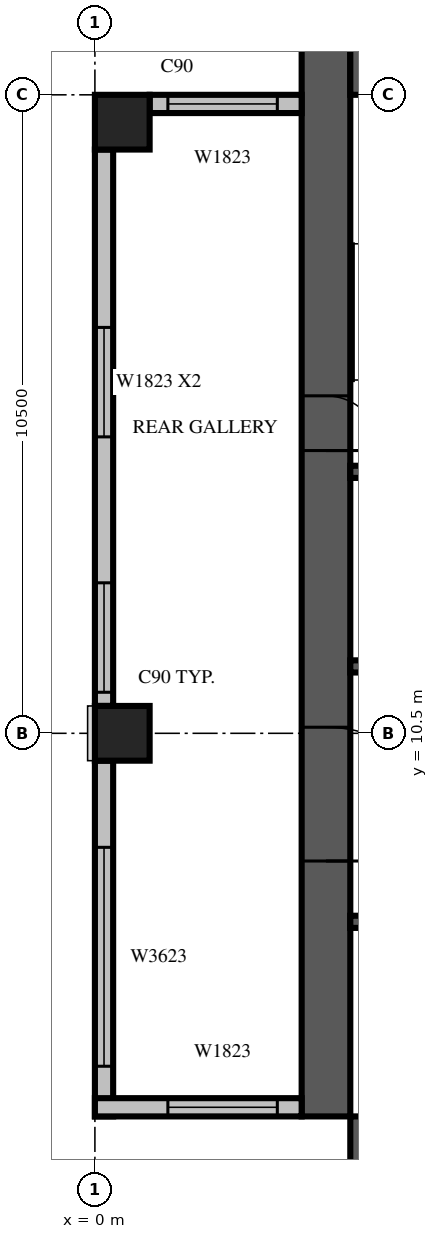
"""IFC4 building model, lengths in metres.
Left out: names, types, materials, properties, quantities, classifications, styles, units other than length and angle.
Written with IfcOpenShell. Run it as: python <this file> out.ifc"""

import sys

from ifc_helpers import new_model, si_unit, direction, frame, frame_2d, origin, origin_2d, place, context, subcontext, project, spatial, rectangle, extrude, source, transform, mapped, element, fill, save


model = new_model("IFC4")
c1 = context("Model", 3, precision=1e-05, world=origin(), true_north=direction((0.0, 1.0)))
c2 = subcontext(c1, "Body", "Model", "MODEL_VIEW")
j1 = project(units=[si_unit("LENGTHUNIT", "METRE"), si_unit("PLANEANGLEUNIT", "RADIAN")], contexts=[c1])
p1 = place(None, origin())
s1 = spatial("IfcSite", under=j1, at=p1, CompositionType="ELEMENT")
p2 = place(p1, origin())
s2 = spatial("IfcBuilding", under=s1, at=p2, CompositionType="ELEMENT")
p3 = place(p2, frame((0.0, 0.0, 219.6)))
s3 = spatial("IfcBuildingStorey", under=s2, at=p3, CompositionType="ELEMENT", Elevation=219.6)
m1 = source(origin(), c2, "Body", "SweptSolid", [
    extrude(rectangle(XDim=0.9, YDim=0.9, at=origin_2d()), origin(), (0.0, 0.0, 1.0), 3.8),
])
for number, where, z_axis, x_axis in (
    (1, (0.45, 10.5, 0.0), (0.0, 0.0, 1.0), (1.0, 0.0, 0.0)),
    (2, (0.45, 20.55, 0.0), (0.0, 0.0, 1.0), (1.0, 0.0, 0.0)),
):
    element("IfcColumn", number, at=place(p3, frame(where, z_axis=z_axis, x_axis=x_axis)), inside=s3, PredefinedType="COLUMN", context=c2, shape_type="MappedRepresentation", body=[
        mapped(m1, transform((0.0, 0.0, 0.0), scale=1.0)),
    ])
m2 = source(origin(), c2, "Body", "SweptSolid", [
    extrude(rectangle(XDim=17.6, YDim=0.8, at=frame_2d((8.8, 0.0))), origin(), (0.0, 0.0, 1.0), 3.8),
])
p4 = place(p3, frame((3.8, 4.2, 0.0), z_axis=(0.0, 0.0, 1.0), x_axis=(0.0, 1.0, 0.0)))
e3 = element("IfcWall", 3, at=p4, inside=s3, PredefinedType="SHEAR", context=c2, shape_type="MappedRepresentation", body=[
    mapped(m2, transform((0.0, 0.0, 0.0), scale=1.0)),
])
m3 = source(origin(), c2, "Body", "SweptSolid", [
    extrude(rectangle(XDim=2.2, YDim=2.1, at=frame_2d((1.1, 1.05))), frame((0.0, 0.41, 0.0), z_axis=(0.0, -1.0, 0.0), x_axis=(1.0, 0.0, 0.0)), (0.0, 0.0, 1.0), 0.82),
])
p5 = place(p4, frame((4.2, 0.0, 0.0)))
e4 = element("IfcOpeningElement", 4, at=p5, cuts=e3, PredefinedType="OPENING", context=c2, shape_type="MappedRepresentation", body=[
    mapped(m3, transform((0.0, 0.0, 0.0), scale=1.0)),
])
m4 = source(origin(), c2, "Body", "SweptSolid", [
    extrude(rectangle(XDim=0.9, YDim=2.1, at=frame_2d((0.45, 1.05))), frame((0.0, 0.41, 0.0), z_axis=(0.0, -1.0, 0.0), x_axis=(1.0, 0.0, 0.0)), (0.0, 0.0, 1.0), 0.82),
])
p6 = place(p4, frame((10.95, 0.0, 0.0)))
e5 = element("IfcOpeningElement", 5, at=p6, cuts=e3, PredefinedType="OPENING", context=c2, shape_type="MappedRepresentation", body=[
    mapped(m4, transform((0.0, 0.0, 0.0), scale=1.0)),
])
p7 = place(p3, frame((4.2, 3.8, 0.0), z_axis=(0.0, 0.0, 1.0), x_axis=(1.0, 0.0, 0.0)))
e6 = element("IfcWall", 6, at=p7, inside=s3, PredefinedType="SHEAR", context=c2, shape_type="MappedRepresentation", body=[
    mapped(m2, transform((0.0, 0.0, 0.0), scale=1.0)),
])
p8 = place(p7, frame((12.75, 0.0, 0.0)))
e7 = element("IfcOpeningElement", 7, at=p8, cuts=e6, PredefinedType="OPENING", context=c2, shape_type="MappedRepresentation", body=[
    mapped(m4, transform((0.0, 0.0, 0.0), scale=1.0)),
])
m5 = source(origin(), c2, "Body", "SweptSolid", [
    extrude(rectangle(XDim=16.8, YDim=0.8, at=frame_2d((8.4, 0.0))), origin(), (0.0, 0.0, 1.0), 3.8),
])
p9 = place(p3, frame((4.2, 21.4, 0.0), z_axis=(0.0, 0.0, 1.0), x_axis=(1.0, 0.0, 0.0)))
e8 = element("IfcWall", 8, at=p9, inside=s3, PredefinedType="SHEAR", context=c2, shape_type="MappedRepresentation", body=[
    mapped(m5, transform((0.0, 0.0, 0.0), scale=1.0)),
])
m6 = source(origin(), c2, "Body", "SweptSolid", [
    extrude(rectangle(XDim=1.2, YDim=2.1, at=frame_2d((0.6, 1.05))), frame((0.0, 0.41, 0.0), z_axis=(0.0, -1.0, 0.0), x_axis=(1.0, 0.0, 0.0)), (0.0, 0.0, 1.0), 0.82),
])
p10 = place(p9, frame((6.2, 0.0, 0.0)))
e9 = element("IfcOpeningElement", 9, at=p10, cuts=e8, PredefinedType="OPENING", context=c2, shape_type="MappedRepresentation", body=[
    mapped(m6, transform((0.0, 0.0, 0.0), scale=1.0)),
])
m7 = source(origin(), c2, "Body", "SweptSolid", [
    extrude(rectangle(XDim=2.5, YDim=0.3, at=frame_2d((1.25, 0.0))), origin(), (0.0, 0.0, 1.0), 3.4),
])
p11 = place(p3, frame((3.4, 20.85, 0.0), z_axis=(0.0, 0.0, 1.0), x_axis=(-1.0, 0.0, 0.0)))
e10 = element("IfcWall", 10, at=p11, inside=s3, PredefinedType="STANDARD", context=c2, shape_type="MappedRepresentation", body=[
    mapped(m7, transform((0.0, 0.0, 0.0), scale=1.0)),
])
m8 = source(origin(), c2, "Body", "SweptSolid", [
    extrude(rectangle(XDim=1.8, YDim=2.3, at=frame_2d((0.9, 1.15))), frame((0.0, 0.16, 0.0), z_axis=(0.0, -1.0, 0.0), x_axis=(1.0, 0.0, 0.0)), (0.0, 0.0, 1.0), 0.32),
])
p12 = place(p11, frame((0.4, 0.0, 0.6)))
e11 = element("IfcOpeningElement", 11, at=p12, cuts=e10, PredefinedType="OPENING", context=c2, shape_type="MappedRepresentation", body=[
    mapped(m8, transform((0.0, 0.0, 0.0), scale=1.0)),
])
m9 = source(origin(), c2, "Body", "SweptSolid", [
    extrude(rectangle(XDim=9.15, YDim=0.3, at=frame_2d((4.575, 0.0))), origin(), (0.0, 0.0, 1.0), 3.4),
])
p13 = place(p3, frame((0.15, 20.1, 0.0), z_axis=(0.0, 0.0, 1.0), x_axis=(0.0, -1.0, 0.0)))
e12 = element("IfcWall", 12, at=p13, inside=s3, PredefinedType="STANDARD", context=c2, shape_type="MappedRepresentation", body=[
    mapped(m9, transform((0.0, 0.0, 0.0), scale=1.0)),
])
p14 = place(p13, frame((2.925, 0.0, 0.6)))
e13 = element("IfcOpeningElement", 13, at=p14, cuts=e12, PredefinedType="OPENING", context=c2, shape_type="MappedRepresentation", body=[
    mapped(m8, transform((0.0, 0.0, 0.0), scale=1.0)),
])
p15 = place(p13, frame((7.125, 0.0, 0.6)))
e14 = element("IfcOpeningElement", 14, at=p15, cuts=e12, PredefinedType="OPENING", context=c2, shape_type="MappedRepresentation", body=[
    mapped(m8, transform((0.0, 0.0, 0.0), scale=1.0)),
])
m10 = source(origin(), c2, "Body", "SweptSolid", [
    extrude(rectangle(XDim=5.85, YDim=0.3, at=frame_2d((2.925, 0.0))), origin(), (0.0, 0.0, 1.0), 3.4),
])
p16 = place(p3, frame((0.15, 10.05, 0.0), z_axis=(0.0, 0.0, 1.0), x_axis=(0.0, -1.0, 0.0)))
e15 = element("IfcWall", 15, at=p16, inside=s3, PredefinedType="STANDARD", context=c2, shape_type="MappedRepresentation", body=[
    mapped(m10, transform((0.0, 0.0, 0.0), scale=1.0)),
])
m11 = source(origin(), c2, "Body", "SweptSolid", [
    extrude(rectangle(XDim=3.6, YDim=2.3, at=frame_2d((1.8, 1.15))), frame((0.0, 0.16, 0.0), z_axis=(0.0, -1.0, 0.0), x_axis=(1.0, 0.0, 0.0)), (0.0, 0.0, 1.0), 0.32),
])
p17 = place(p16, frame((1.425, 0.0, 0.6)))
e16 = element("IfcOpeningElement", 16, at=p17, cuts=e15, PredefinedType="OPENING", context=c2, shape_type="MappedRepresentation", body=[
    mapped(m11, transform((0.0, 0.0, 0.0), scale=1.0)),
])
m12 = source(origin(), c2, "Body", "SweptSolid", [
    extrude(rectangle(XDim=3.4, YDim=0.3, at=frame_2d((1.7, 0.0))), origin(), (0.0, 0.0, 1.0), 3.4),
])
p18 = place(p3, frame((0.0, 4.35, 0.0), z_axis=(0.0, 0.0, 1.0), x_axis=(1.0, 0.0, 0.0)))
e17 = element("IfcWall", 17, at=p18, inside=s3, PredefinedType="STANDARD", context=c2, shape_type="MappedRepresentation", body=[
    mapped(m12, transform((0.0, 0.0, 0.0), scale=1.0)),
])
p19 = place(p18, frame((1.2, 0.0, 0.6)))
e18 = element("IfcOpeningElement", 18, at=p19, cuts=e17, PredefinedType="OPENING", context=c2, shape_type="MappedRepresentation", body=[
    mapped(m8, transform((0.0, 0.0, 0.0), scale=1.0)),
])
m13 = source(origin(), c2, "Body", "SweptSolid", [
    extrude(rectangle(XDim=9.6, YDim=0.2, at=frame_2d((4.8, 0.0))), origin(), (0.0, 0.0, 1.0), 3.8),
])
p20 = place(p3, frame((4.2, 7.4, 0.0), z_axis=(0.0, 0.0, 1.0), x_axis=(1.0, 0.0, 0.0)))
e19 = element("IfcWall", 19, at=p20, inside=s3, PredefinedType="SOLIDWALL", context=c2, shape_type="MappedRepresentation", body=[
    mapped(m13, transform((0.0, 0.0, 0.0), scale=1.0)),
])
m14 = source(origin(), c2, "Body", "SweptSolid", [
    extrude(rectangle(XDim=1.1, YDim=2.1, at=frame_2d((0.55, 1.05))), frame((0.0, 0.11, 0.0), z_axis=(0.0, -1.0, 0.0), x_axis=(1.0, 0.0, 0.0)), (0.0, 0.0, 1.0), 0.22),
])
p21 = place(p20, frame((0.65, 0.0, 0.0)))
e20 = element("IfcOpeningElement", 20, at=p21, cuts=e19, PredefinedType="OPENING", context=c2, shape_type="MappedRepresentation", body=[
    mapped(m14, transform((0.0, 0.0, 0.0), scale=1.0)),
])
p22 = place(p20, frame((3.05, 0.0, 0.0)))
e21 = element("IfcOpeningElement", 21, at=p22, cuts=e19, PredefinedType="OPENING", context=c2, shape_type="MappedRepresentation", body=[
    mapped(m14, transform((0.0, 0.0, 0.0), scale=1.0)),
])
p23 = place(p20, frame((5.45, 0.0, 0.0)))
e22 = element("IfcOpeningElement", 22, at=p23, cuts=e19, PredefinedType="OPENING", context=c2, shape_type="MappedRepresentation", body=[
    mapped(m14, transform((0.0, 0.0, 0.0), scale=1.0)),
])
p24 = place(p20, frame((7.85, 0.0, 0.0)))
e23 = element("IfcOpeningElement", 23, at=p24, cuts=e19, PredefinedType="OPENING", context=c2, shape_type="MappedRepresentation", body=[
    mapped(m14, transform((0.0, 0.0, 0.0), scale=1.0)),
])
m15 = source(origin(), c2, "Body", "SweptSolid", [
    extrude(rectangle(XDim=4.8, YDim=0.2, at=frame_2d((2.4, 0.0))), origin(), (0.0, 0.0, 1.0), 3.8),
])
p25 = place(p3, frame((4.2, 11.6, 0.0), z_axis=(0.0, 0.0, 1.0), x_axis=(1.0, 0.0, 0.0)))
e24 = element("IfcWall", 24, at=p25, inside=s3, PredefinedType="SOLIDWALL", context=c2, shape_type="MappedRepresentation", body=[
    mapped(m15, transform((0.0, 0.0, 0.0), scale=1.0)),
])
p26 = place(p25, frame((0.65, 0.0, 0.0)))
e25 = element("IfcOpeningElement", 25, at=p26, cuts=e24, PredefinedType="OPENING", context=c2, shape_type="MappedRepresentation", body=[
    mapped(m14, transform((0.0, 0.0, 0.0), scale=1.0)),
])
p27 = place(p25, frame((3.05, 0.0, 0.0)))
e26 = element("IfcOpeningElement", 26, at=p27, cuts=e24, PredefinedType="OPENING", context=c2, shape_type="MappedRepresentation", body=[
    mapped(m14, transform((0.0, 0.0, 0.0), scale=1.0)),
])
p28 = place(p3, frame((4.2, 14.8, 0.0), z_axis=(0.0, 0.0, 1.0), x_axis=(1.0, 0.0, 0.0)))
e27 = element("IfcWall", 27, at=p28, inside=s3, PredefinedType="SOLIDWALL", context=c2, shape_type="MappedRepresentation", body=[
    mapped(m15, transform((0.0, 0.0, 0.0), scale=1.0)),
])
m16 = source(origin(), c2, "Body", "SweptSolid", [
    extrude(rectangle(XDim=1.8, YDim=2.3, at=frame_2d((0.9, 1.15))), frame((0.0, 0.03, 0.0), z_axis=(0.0, -1.0, 0.0), x_axis=(1.0, 0.0, 0.0)), (0.0, 0.0, 1.0), 0.06),
])
p29 = place(p12, origin())
e28 = element("IfcWindow", 28, at=p29, inside=s3, PartitioningType="SINGLE_PANEL", PredefinedType="WINDOW", context=c2, shape_type="MappedRepresentation", body=[
    mapped(m16, transform((0.0, 0.0, 0.0), scale=1.0)),
])
fill(e11, e28)
p30 = place(p14, origin())
e29 = element("IfcWindow", 29, at=p30, inside=s3, PartitioningType="SINGLE_PANEL", PredefinedType="WINDOW", context=c2, shape_type="MappedRepresentation", body=[
    mapped(m16, transform((0.0, 0.0, 0.0), scale=1.0)),
])
fill(e13, e29)
p31 = place(p15, origin())
e30 = element("IfcWindow", 30, at=p31, inside=s3, PartitioningType="SINGLE_PANEL", PredefinedType="WINDOW", context=c2, shape_type="MappedRepresentation", body=[
    mapped(m16, transform((0.0, 0.0, 0.0), scale=1.0)),
])
fill(e14, e30)
m17 = source(origin(), c2, "Body", "SweptSolid", [
    extrude(rectangle(XDim=3.6, YDim=2.3, at=frame_2d((1.8, 1.15))), frame((0.0, 0.03, 0.0), z_axis=(0.0, -1.0, 0.0), x_axis=(1.0, 0.0, 0.0)), (0.0, 0.0, 1.0), 0.06),
])
p32 = place(p17, origin())
e31 = element("IfcWindow", 31, at=p32, inside=s3, PartitioningType="SINGLE_PANEL", PredefinedType="WINDOW", context=c2, shape_type="MappedRepresentation", body=[
    mapped(m17, transform((0.0, 0.0, 0.0), scale=1.0)),
])
fill(e16, e31)
p33 = place(p19, origin())
e32 = element("IfcWindow", 32, at=p33, inside=s3, PartitioningType="SINGLE_PANEL", PredefinedType="WINDOW", context=c2, shape_type="MappedRepresentation", body=[
    mapped(m16, transform((0.0, 0.0, 0.0), scale=1.0)),
])
fill(e18, e32)
m18 = source(origin(), c2, "Body", "SweptSolid", [
    extrude(rectangle(XDim=2.2, YDim=2.1, at=frame_2d((1.1, 1.05))), frame((0.0, 0.025, 0.0), z_axis=(0.0, -1.0, 0.0), x_axis=(1.0, 0.0, 0.0)), (0.0, 0.0, 1.0), 0.05),
])
p34 = place(p5, origin())
e33 = element("IfcDoor", 33, at=p34, inside=s3, OperationType="DOUBLE_DOOR_SINGLE_SWING", PredefinedType="DOOR", context=c2, shape_type="MappedRepresentation", body=[
    mapped(m18, transform((0.0, 0.0, 0.0), scale=1.0)),
])
fill(e4, e33)
m19 = source(origin(), c2, "Body", "SweptSolid", [
    extrude(rectangle(XDim=0.9, YDim=2.1, at=frame_2d((0.45, 1.05))), frame((0.0, 0.025, 0.0), z_axis=(0.0, -1.0, 0.0), x_axis=(1.0, 0.0, 0.0)), (0.0, 0.0, 1.0), 0.05),
])
p35 = place(p6, origin())
e34 = element("IfcDoor", 34, at=p35, inside=s3, OperationType="SINGLE_SWING_RIGHT", PredefinedType="DOOR", context=c2, shape_type="MappedRepresentation", body=[
    mapped(m19, transform((0.0, 0.0, 0.0), scale=1.0)),
])
fill(e5, e34)
save(model, sys.argv[1])
